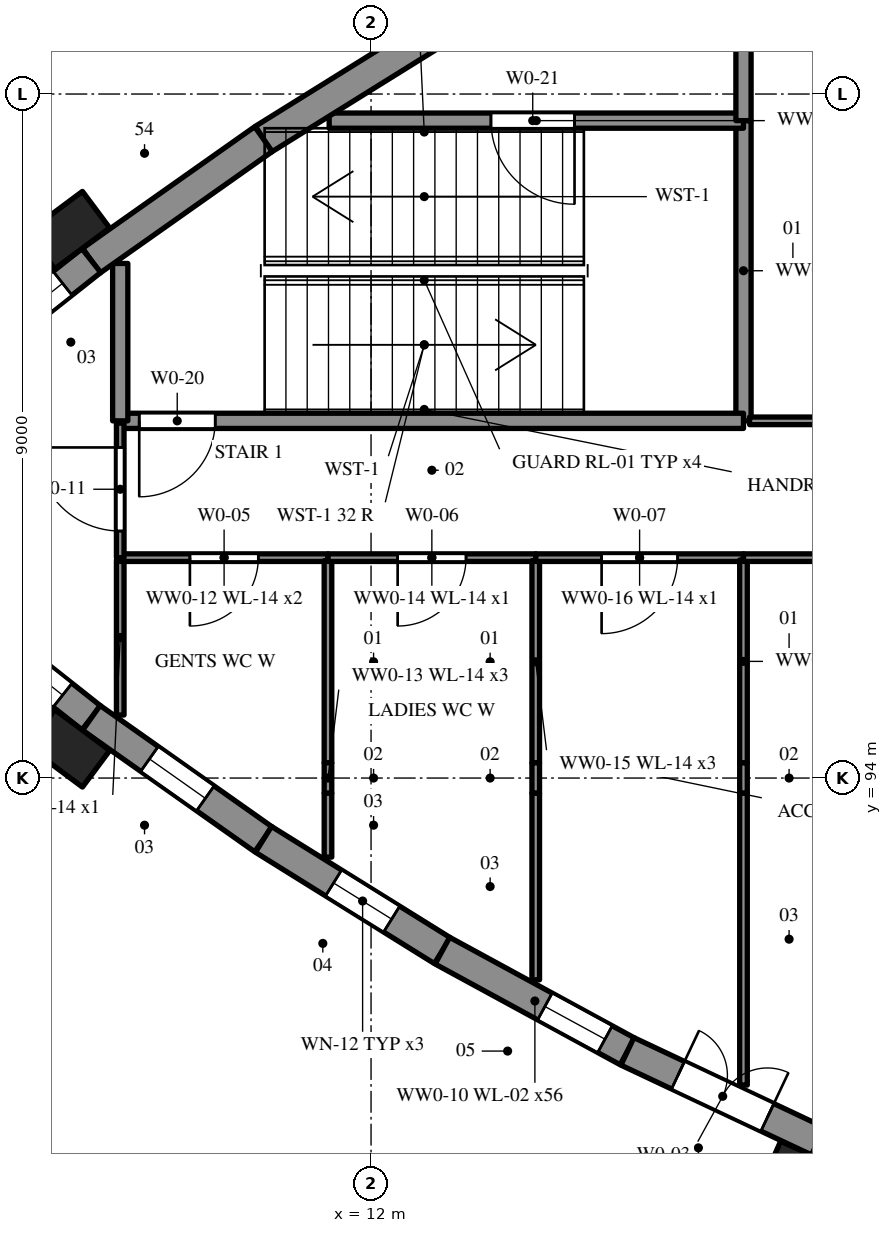
"""IFC4 building model, lengths in metres.
Left out: names, types, materials, properties, quantities, classifications, styles, units other than length and angle.
Written with IfcOpenShell. Run it as: python <this file> out.ifc"""

import sys

from ifc_helpers import new_model, si_unit, direction, frame, frame_2d, origin, origin_2d, place, context, subcontext, project, spatial, rectangle, extrude, element, fill, save


model = new_model("IFC4")
c1 = context("Model", 3, precision=1e-05, world=origin(), true_north=direction((0.0, 1.0)))
c2 = subcontext(c1, "Body", "Model", "MODEL_VIEW")
j1 = project(units=[si_unit("LENGTHUNIT", "METRE"), si_unit("PLANEANGLEUNIT", "RADIAN")], contexts=[c1])
p1 = place(None, origin())
s1 = spatial("IfcSite", under=j1, at=p1, CompositionType="ELEMENT")
p2 = place(p1, origin())
s2 = spatial("IfcBuilding", under=s1, at=p2, CompositionType="ELEMENT")
p3 = place(p2, origin())
s3 = spatial("IfcBuildingStorey", under=s2, at=p3, CompositionType="ELEMENT", Elevation=0.0)
p4 = place(p3, frame((16.9, 102.65, -0.25), z_axis=(0.0, 0.0, 1.0), x_axis=(0.0, -1.0, 0.0)))
e1 = element("IfcWall", 1, at=p4, inside=s3, PredefinedType="SHEAR", context=c2, shape_type="SweptSolid", body=[
    extrude(rectangle(XDim=3.95, YDim=0.2, at=frame_2d((1.975, 0.0))), origin(), (0.0, 0.0, 1.0), 5.65),
])
p5 = place(p3, frame((16.9, 98.7, -0.25), z_axis=(0.0, 0.0, 1.0), x_axis=(-1.0, 0.0, 0.0)))
e2 = element("IfcWall", 2, at=p5, inside=s3, PredefinedType="SHEAR", context=c2, shape_type="SweptSolid", body=[
    extrude(rectangle(XDim=8.2, YDim=0.2, at=frame_2d((4.1, 0.0))), origin(), (0.0, 0.0, 1.0), 5.65),
])
p6 = place(p5, frame((6.95, 0.0, 0.25)))
e3 = element("IfcOpeningElement", 3, at=p6, cuts=e2, PredefinedType="OPENING", context=c2, shape_type="SweptSolid", body=[
    extrude(rectangle(XDim=1.0, YDim=2.4, at=frame_2d((0.5, 1.2))), frame((0.0, 0.11, 0.0), z_axis=(0.0, -1.0, 0.0), x_axis=(1.0, 0.0, 0.0)), (0.0, 0.0, 1.0), 0.22),
])
p7 = place(p3, frame((8.7, 98.7, -0.25), z_axis=(0.0, 0.0, 1.0), x_axis=(0.0, 1.0, 0.0)))
e4 = element("IfcWall", 4, at=p7, inside=s3, PredefinedType="SHEAR", context=c2, shape_type="SweptSolid", body=[
    extrude(rectangle(XDim=2.071, YDim=0.2, at=frame_2d((1.035, 0.0))), origin(), (0.0, 0.0, 1.0), 5.65),
])
p8 = place(p3, frame((11.449, 102.65, -0.25), z_axis=(0.0, 0.0, 1.0), x_axis=(1.0, 0.0, 0.0)))
e5 = element("IfcWall", 5, at=p8, inside=s3, PredefinedType="SHEAR", context=c2, shape_type="SweptSolid", body=[
    extrude(rectangle(XDim=5.451, YDim=0.2, at=frame_2d((2.726, 0.0))), origin(), (0.0, 0.0, 1.0), 5.65),
])
p9 = place(p8, frame((2.128, 0.0, 0.25)))
e6 = element("IfcOpeningElement", 6, at=p9, cuts=e5, PredefinedType="OPENING", context=c2, shape_type="SweptSolid", body=[
    extrude(rectangle(XDim=1.1, YDim=2.1, at=frame_2d((0.55, 1.05))), frame((0.0, 0.11, 0.0), z_axis=(0.0, -1.0, 0.0), x_axis=(1.0, 0.0, 0.0)), (0.0, 0.0, 1.0), 0.22),
])
p10 = place(p3, frame((16.9, 105.64, -0.25), z_axis=(0.0, 0.0, 1.0), x_axis=(0.0, -1.0, 0.0)))
e7 = element("IfcWall", 7, at=p10, inside=s3, PredefinedType="SHEAR", context=c2, shape_type="SweptSolid", body=[
    extrude(rectangle(XDim=2.99, YDim=0.2, at=frame_2d((1.495, 0.0))), origin(), (0.0, 0.0, 1.0), 5.65),
])
p11 = place(p3, frame((6.387, 96.32, -0.25), z_axis=(0.0, 0.0, 1.0), x_axis=(0.784278812541, -0.620408530082, 0.0)))
e8 = element("IfcWall", 8, at=p11, inside=s3, PredefinedType="SOLIDWALL", context=c2, shape_type="SweptSolid", body=[
    extrude(rectangle(XDim=2.464, YDim=0.4, at=frame_2d((1.232, 0.0))), origin(), (0.0, 0.0, 1.0), 5.65),
])
p12 = place(p11, frame((0.482, 0.0, 2.65)))
e9 = element("IfcOpeningElement", 9, at=p12, cuts=e8, PredefinedType="OPENING", context=c2, shape_type="SweptSolid", body=[
    extrude(rectangle(XDim=1.5, YDim=0.6, at=frame_2d((0.75, 0.3))), frame((0.0, 0.21, 0.0), z_axis=(0.0, -1.0, 0.0), x_axis=(1.0, 0.0, 0.0)), (0.0, 0.0, 1.0), 0.42),
])
p13 = place(p3, frame((8.32, 94.792, -0.25), z_axis=(0.0, 0.0, 1.0), x_axis=(0.817028877428, -0.576596751161, 0.0)))
e10 = element("IfcWall", 10, at=p13, inside=s3, PredefinedType="SOLIDWALL", context=c2, shape_type="SweptSolid", body=[
    extrude(rectangle(XDim=2.772, YDim=0.4, at=frame_2d((1.386, 0.0))), origin(), (0.0, 0.0, 1.0), 5.65),
])
p14 = place(p13, frame((0.936, 0.0, 1.85)))
e11 = element("IfcOpeningElement", 11, at=p14, cuts=e10, PredefinedType="OPENING", context=c2, shape_type="SweptSolid", body=[
    extrude(rectangle(XDim=0.9, YDim=0.6, at=frame_2d((0.45, 0.3))), frame((0.0, 0.21, 0.0), z_axis=(0.0, -1.0, 0.0), x_axis=(1.0, 0.0, 0.0)), (0.0, 0.0, 1.0), 0.42),
])
p15 = place(p3, frame((10.585, 93.193, -0.25), z_axis=(0.0, 0.0, 1.0), x_axis=(0.84912946359, -0.528184772653, 0.0)))
e12 = element("IfcWall", 12, at=p15, inside=s3, PredefinedType="SOLIDWALL", context=c2, shape_type="SweptSolid", body=[
    extrude(rectangle(XDim=2.772, YDim=0.4, at=frame_2d((1.386, 0.0))), origin(), (0.0, 0.0, 1.0), 5.65),
])
p16 = place(p15, frame((1.086, 0.0, 1.85)))
e13 = element("IfcOpeningElement", 13, at=p16, cuts=e12, PredefinedType="OPENING", context=c2, shape_type="SweptSolid", body=[
    extrude(rectangle(XDim=0.9, YDim=0.6, at=frame_2d((0.45, 0.3))), frame((0.0, 0.21, 0.0), z_axis=(0.0, -1.0, 0.0), x_axis=(1.0, 0.0, 0.0)), (0.0, 0.0, 1.0), 0.42),
])
p17 = place(p3, frame((12.938, 91.729, -0.25), z_axis=(0.0, 0.0, 1.0), x_axis=(0.878292493566, -0.478123724308, 0.0)))
e14 = element("IfcWall", 14, at=p17, inside=s3, PredefinedType="SOLIDWALL", context=c2, shape_type="SweptSolid", body=[
    extrude(rectangle(XDim=2.772, YDim=0.4, at=frame_2d((1.386, 0.0))), origin(), (0.0, 0.0, 1.0), 5.65),
])
p18 = place(p17, frame((1.536, 0.0, 1.85)))
e15 = element("IfcOpeningElement", 15, at=p18, cuts=e14, PredefinedType="OPENING", context=c2, shape_type="SweptSolid", body=[
    extrude(rectangle(XDim=0.9, YDim=0.6, at=frame_2d((0.45, 0.3))), frame((0.0, 0.21, 0.0), z_axis=(0.0, -1.0, 0.0), x_axis=(1.0, 0.0, 0.0)), (0.0, 0.0, 1.0), 0.42),
])
p19 = place(p3, frame((15.373, 90.404, -0.25), z_axis=(0.0, 0.0, 1.0), x_axis=(0.904527098751, -0.42641614372, 0.0)))
e16 = element("IfcWall", 16, at=p19, inside=s3, PredefinedType="SOLIDWALL", context=c2, shape_type="SweptSolid", body=[
    extrude(rectangle(XDim=2.772, YDim=0.4, at=frame_2d((1.386, 0.0))), origin(), (0.0, 0.0, 1.0), 5.65),
])
p20 = place(p19, frame((0.736, 0.0, 0.25)))
e17 = element("IfcOpeningElement", 17, at=p20, cuts=e16, PredefinedType="OPENING", context=c2, shape_type="SweptSolid", body=[
    extrude(rectangle(XDim=1.3, YDim=2.1, at=frame_2d((0.65, 1.05))), frame((0.0, 0.21, 0.0), z_axis=(0.0, -1.0, 0.0), x_axis=(1.0, 0.0, 0.0)), (0.0, 0.0, 1.0), 0.42),
])
for number, where, z_axis, x_axis in (
    (18, (12.938, 103.871, -0.25), (0.0, 0.0, 1.0), (-0.849, -0.528, 0.0)),
    (19, (10.585, 102.407, -0.25), (0.0, 0.0, 1.0), (-0.817, -0.577, 0.0)),
):
    element("IfcWall", number, at=place(p3, frame(where, z_axis=z_axis, x_axis=x_axis)), inside=s3, PredefinedType="SOLIDWALL", context=c2, shape_type="SweptSolid", body=[
        extrude(rectangle(XDim=2.772, YDim=0.4, at=frame_2d((1.386, 0.0))), origin(), (0.0, 0.0, 1.0), 5.65),
    ])
p21 = place(p3, frame((8.32, 100.809, -0.25), z_axis=(0.0, 0.0, 1.0), x_axis=(-0.784278812541, -0.620408530082, 0.0)))
e20 = element("IfcWall", 20, at=p21, inside=s3, PredefinedType="SOLIDWALL", context=c2, shape_type="SweptSolid", body=[
    extrude(rectangle(XDim=2.464, YDim=0.4, at=frame_2d((1.232, 0.0))), origin(), (0.0, 0.0, 1.0), 5.65),
])
p22 = place(p21, frame((0.482, 0.0, 2.65)))
e21 = element("IfcOpeningElement", 21, at=p22, cuts=e20, PredefinedType="OPENING", context=c2, shape_type="SweptSolid", body=[
    extrude(rectangle(XDim=1.5, YDim=0.6, at=frame_2d((0.75, 0.3))), frame((0.0, 0.21, 0.0), z_axis=(0.0, -1.0, 0.0), x_axis=(1.0, 0.0, 0.0)), (0.0, 0.0, 1.0), 0.42),
])
for number, where, z_axis, x_axis in (
    (22, (8.021, 94.391, -0.25), (0.0, 0.0, 1.0), (0.802, -0.597, 0.0)),
    (23, (17.679, 88.764, -0.25), (0.0, 0.0, 1.0), (0.915, -0.403, 0.0)),
    (24, (8.021, 101.209, -0.25), (0.0, 0.0, 1.0), (-0.802, -0.597, 0.0)),
):
    element("IfcColumn", number, at=place(p3, frame(where, z_axis=z_axis, x_axis=x_axis)), inside=s3, PredefinedType="PILASTER", context=c2, shape_type="SweptSolid", body=[
        extrude(rectangle(XDim=0.9, YDim=0.6, at=origin_2d()), origin(), (0.0, 0.0, 1.0), 5.65),
    ])
p23 = place(p3, frame((8.7, 94.829, 0.0), z_axis=(0.0, 0.0, 1.0), x_axis=(0.0, 1.0, 0.0)))
e25 = element("IfcWall", 25, at=p23, inside=s3, PredefinedType="PARTITIONING", context=c2, shape_type="SweptSolid", body=[
    extrude(rectangle(XDim=2.041, YDim=0.1, at=frame_2d((1.021, 0.0))), origin(), (0.0, 0.0, 1.0), 5.12),
])
p24 = place(p3, frame((11.433, 96.9, 0.0), z_axis=(0.0, 0.0, 1.0), x_axis=(-1.0, 0.0, 0.0)))
e26 = element("IfcWall", 26, at=p24, inside=s3, PredefinedType="PARTITIONING", context=c2, shape_type="SweptSolid", body=[
    extrude(rectangle(XDim=2.733, YDim=0.1, at=frame_2d((1.367, 0.0))), origin(), (0.0, 0.0, 1.0), 5.12),
])
p25 = place(p24, frame((0.917, 0.0, 0.0)))
e27 = element("IfcOpeningElement", 27, at=p25, cuts=e26, PredefinedType="OPENING", context=c2, shape_type="SweptSolid", body=[
    extrude(rectangle(XDim=0.9, YDim=2.1, at=frame_2d((0.45, 1.05))), frame((0.0, 0.06, 0.0), z_axis=(0.0, -1.0, 0.0), x_axis=(1.0, 0.0, 0.0)), (0.0, 0.0, 1.0), 0.12),
])
p26 = place(p3, frame((8.7, 96.9, 0.0), z_axis=(0.0, 0.0, 1.0), x_axis=(0.0, 1.0, 0.0)))
e28 = element("IfcWall", 28, at=p26, inside=s3, PredefinedType="PARTITIONING", context=c2, shape_type="SweptSolid", body=[
    extrude(rectangle(XDim=1.77, YDim=0.1, at=frame_2d((0.885, 0.0))), origin(), (0.0, 0.0, 1.0), 5.12),
])
p27 = place(p26, frame((0.35, 0.0, 0.0)))
e29 = element("IfcOpeningElement", 29, at=p27, cuts=e28, PredefinedType="OPENING", context=c2, shape_type="SweptSolid", body=[
    extrude(rectangle(XDim=1.1, YDim=2.1, at=frame_2d((0.55, 1.05))), frame((0.0, 0.06, 0.0), z_axis=(0.0, -1.0, 0.0), x_axis=(1.0, 0.0, 0.0)), (0.0, 0.0, 1.0), 0.12),
])
p28 = place(p3, frame((11.433, 96.86, 0.0), z_axis=(0.0, 0.0, 1.0), x_axis=(0.0, -1.0, 0.0)))
e30 = element("IfcWall", 30, at=p28, inside=s3, PredefinedType="PARTITIONING", context=c2, shape_type="SweptSolid", body=[
    extrude(rectangle(XDim=2.66, YDim=0.1, at=frame_2d((1.33, 0.0))), origin(), (0.0, 0.0, 1.0), 5.12),
])
p29 = place(p3, frame((11.433, 94.2, 0.0), z_axis=(0.0, 0.0, 1.0), x_axis=(0.0, -1.0, 0.0)))
e31 = element("IfcWall", 31, at=p29, inside=s3, PredefinedType="PARTITIONING", context=c2, shape_type="SweptSolid", body=[
    extrude(rectangle(XDim=0.4, YDim=0.1, at=frame_2d((0.2, 0.0))), origin(), (0.0, 0.0, 1.0), 4.32),
])
p30 = place(p3, frame((11.433, 93.8, 0.0), z_axis=(0.0, 0.0, 1.0), x_axis=(0.0, -1.0, 0.0)))
e32 = element("IfcWall", 32, at=p30, inside=s3, PredefinedType="PARTITIONING", context=c2, shape_type="SweptSolid", body=[
    extrude(rectangle(XDim=0.84, YDim=0.1, at=frame_2d((0.42, 0.0))), origin(), (0.0, 0.0, 1.0), 5.12),
])
p31 = place(p3, frame((14.167, 96.9, 0.0), z_axis=(0.0, 0.0, 1.0), x_axis=(-1.0, 0.0, 0.0)))
e33 = element("IfcWall", 33, at=p31, inside=s3, PredefinedType="PARTITIONING", context=c2, shape_type="SweptSolid", body=[
    extrude(rectangle(XDim=2.733, YDim=0.1, at=frame_2d((1.367, 0.0))), origin(), (0.0, 0.0, 1.0), 5.12),
])
p32 = place(p31, frame((0.917, 0.0, 0.0)))
e34 = element("IfcOpeningElement", 34, at=p32, cuts=e33, PredefinedType="OPENING", context=c2, shape_type="SweptSolid", body=[
    extrude(rectangle(XDim=0.9, YDim=2.1, at=frame_2d((0.45, 1.05))), frame((0.0, 0.06, 0.0), z_axis=(0.0, -1.0, 0.0), x_axis=(1.0, 0.0, 0.0)), (0.0, 0.0, 1.0), 0.12),
])
p33 = place(p3, frame((14.167, 96.86, 0.0), z_axis=(0.0, 0.0, 1.0), x_axis=(0.0, -1.0, 0.0)))
e35 = element("IfcWall", 35, at=p33, inside=s3, PredefinedType="PARTITIONING", context=c2, shape_type="SweptSolid", body=[
    extrude(rectangle(XDim=2.66, YDim=0.1, at=frame_2d((1.33, 0.0))), origin(), (0.0, 0.0, 1.0), 5.12),
])
p34 = place(p3, frame((14.167, 94.2, 0.0), z_axis=(0.0, 0.0, 1.0), x_axis=(0.0, -1.0, 0.0)))
e36 = element("IfcWall", 36, at=p34, inside=s3, PredefinedType="PARTITIONING", context=c2, shape_type="SweptSolid", body=[
    extrude(rectangle(XDim=0.4, YDim=0.1, at=frame_2d((0.2, 0.0))), origin(), (0.0, 0.0, 1.0), 4.32),
])
p35 = place(p3, frame((14.167, 93.8, 0.0), z_axis=(0.0, 0.0, 1.0), x_axis=(0.0, -1.0, 0.0)))
e37 = element("IfcWall", 37, at=p35, inside=s3, PredefinedType="PARTITIONING", context=c2, shape_type="SweptSolid", body=[
    extrude(rectangle(XDim=2.455, YDim=0.1, at=frame_2d((1.228, 0.0))), origin(), (0.0, 0.0, 1.0), 5.12),
])
p36 = place(p3, frame((16.9, 96.9, 0.0), z_axis=(0.0, 0.0, 1.0), x_axis=(-1.0, 0.0, 0.0)))
e38 = element("IfcWall", 38, at=p36, inside=s3, PredefinedType="PARTITIONING", context=c2, shape_type="SweptSolid", body=[
    extrude(rectangle(XDim=2.733, YDim=0.1, at=frame_2d((1.367, 0.0))), origin(), (0.0, 0.0, 1.0), 5.12),
])
p37 = place(p36, frame((0.867, 0.0, 0.0)))
e39 = element("IfcOpeningElement", 39, at=p37, cuts=e38, PredefinedType="OPENING", context=c2, shape_type="SweptSolid", body=[
    extrude(rectangle(XDim=1.0, YDim=2.1, at=frame_2d((0.5, 1.05))), frame((0.0, 0.06, 0.0), z_axis=(0.0, -1.0, 0.0), x_axis=(1.0, 0.0, 0.0)), (0.0, 0.0, 1.0), 0.12),
])
p38 = place(p3, frame((16.9, 96.87, 0.0), z_axis=(0.0, 0.0, 1.0), x_axis=(0.0, -1.0, 0.0)))
e40 = element("IfcWall", 40, at=p38, inside=s3, PredefinedType="PARTITIONING", context=c2, shape_type="SweptSolid", body=[
    extrude(rectangle(XDim=2.67, YDim=0.1, at=frame_2d((1.335, 0.0))), origin(), (0.0, 0.0, 1.0), 5.12),
])
p39 = place(p3, frame((16.9, 94.2, 0.0), z_axis=(0.0, 0.0, 1.0), x_axis=(0.0, -1.0, 0.0)))
e41 = element("IfcWall", 41, at=p39, inside=s3, PredefinedType="PARTITIONING", context=c2, shape_type="SweptSolid", body=[
    extrude(rectangle(XDim=0.4, YDim=0.1, at=frame_2d((0.2, 0.0))), origin(), (0.0, 0.0, 1.0), 4.32),
])
p40 = place(p3, frame((16.9, 93.8, 0.0), z_axis=(0.0, 0.0, 1.0), x_axis=(0.0, -1.0, 0.0)))
e42 = element("IfcWall", 42, at=p40, inside=s3, PredefinedType="PARTITIONING", context=c2, shape_type="SweptSolid", body=[
    extrude(rectangle(XDim=3.84, YDim=0.1, at=frame_2d((1.92, 0.0))), origin(), (0.0, 0.0, 1.0), 5.12),
])
p41 = place(p3, frame((20.825, 96.9, 0.0), z_axis=(0.0, 0.0, 1.0), x_axis=(-1.0, 0.0, 0.0)))
e43 = element("IfcWall", 43, at=p41, inside=s3, PredefinedType="PARTITIONING", context=c2, shape_type="SweptSolid", body=[
    extrude(rectangle(XDim=3.925, YDim=0.1, at=frame_2d((1.962, 0.0))), origin(), (0.0, 0.0, 1.0), 5.12),
])
p42 = place(p3, frame((16.98, 98.7, 0.0), z_axis=(0.0, 0.0, 1.0), x_axis=(1.0, 0.0, 0.0)))
e44 = element("IfcWall", 44, at=p42, inside=s3, PredefinedType="PARTITIONING", context=c2, shape_type="SweptSolid", body=[
    extrude(rectangle(XDim=3.845, YDim=0.1, at=frame_2d((1.922, 0.0))), origin(), (0.0, 0.0, 1.0), 5.12),
])
p43 = place(p20, origin())
e45 = element("IfcDoor", 45, at=p43, inside=s3, OperationType="DOUBLE_DOOR_SINGLE_SWING", PredefinedType="DOOR", context=c2, shape_type="SweptSolid", body=[
    extrude(rectangle(XDim=1.3, YDim=2.1, at=frame_2d((0.65, 1.05))), frame((0.0, 0.025, 0.0), z_axis=(0.0, -1.0, 0.0), x_axis=(1.0, 0.0, 0.0)), (0.0, 0.0, 1.0), 0.05),
])
fill(e17, e45)
p44 = place(p12, origin())
e46 = element("IfcWindow", 46, at=p44, inside=s3, PartitioningType="SINGLE_PANEL", PredefinedType="WINDOW", context=c2, shape_type="SweptSolid", body=[
    extrude(rectangle(XDim=1.5, YDim=0.6, at=frame_2d((0.75, 0.3))), frame((0.0, 0.03, 0.0), z_axis=(0.0, -1.0, 0.0), x_axis=(1.0, 0.0, 0.0)), (0.0, 0.0, 1.0), 0.06),
])
fill(e9, e46)
p45 = place(p14, origin())
e47 = element("IfcWindow", 47, at=p45, inside=s3, PartitioningType="SINGLE_PANEL", PredefinedType="WINDOW", context=c2, shape_type="SweptSolid", body=[
    extrude(rectangle(XDim=0.9, YDim=0.6, at=frame_2d((0.45, 0.3))), frame((0.0, 0.03, 0.0), z_axis=(0.0, -1.0, 0.0), x_axis=(1.0, 0.0, 0.0)), (0.0, 0.0, 1.0), 0.06),
])
fill(e11, e47)
p46 = place(p16, origin())
e48 = element("IfcWindow", 48, at=p46, inside=s3, PartitioningType="SINGLE_PANEL", PredefinedType="WINDOW", context=c2, shape_type="SweptSolid", body=[
    extrude(rectangle(XDim=0.9, YDim=0.6, at=frame_2d((0.45, 0.3))), frame((0.0, 0.03, 0.0), z_axis=(0.0, -1.0, 0.0), x_axis=(1.0, 0.0, 0.0)), (0.0, 0.0, 1.0), 0.06),
])
fill(e13, e48)
p47 = place(p18, origin())
e49 = element("IfcWindow", 49, at=p47, inside=s3, PartitioningType="SINGLE_PANEL", PredefinedType="WINDOW", context=c2, shape_type="SweptSolid", body=[
    extrude(rectangle(XDim=0.9, YDim=0.6, at=frame_2d((0.45, 0.3))), frame((0.0, 0.03, 0.0), z_axis=(0.0, -1.0, 0.0), x_axis=(1.0, 0.0, 0.0)), (0.0, 0.0, 1.0), 0.06),
])
fill(e15, e49)
p48 = place(p22, origin())
e50 = element("IfcWindow", 50, at=p48, inside=s3, PartitioningType="SINGLE_PANEL", PredefinedType="WINDOW", context=c2, shape_type="SweptSolid", body=[
    extrude(rectangle(XDim=1.5, YDim=0.6, at=frame_2d((0.75, 0.3))), frame((0.0, 0.03, 0.0), z_axis=(0.0, -1.0, 0.0), x_axis=(1.0, 0.0, 0.0)), (0.0, 0.0, 1.0), 0.06),
])
fill(e21, e50)
p49 = place(p25, origin())
e51 = element("IfcDoor", 51, at=p49, inside=s3, OperationType="SINGLE_SWING_RIGHT", PredefinedType="DOOR", context=c2, shape_type="SweptSolid", body=[
    extrude(rectangle(XDim=0.9, YDim=2.1, at=frame_2d((0.45, 1.05))), frame((0.0, 0.025, 0.0), z_axis=(0.0, -1.0, 0.0), x_axis=(1.0, 0.0, 0.0)), (0.0, 0.0, 1.0), 0.05),
])
fill(e27, e51)
p50 = place(p32, origin())
e52 = element("IfcDoor", 52, at=p50, inside=s3, OperationType="SINGLE_SWING_RIGHT", PredefinedType="DOOR", context=c2, shape_type="SweptSolid", body=[
    extrude(rectangle(XDim=0.9, YDim=2.1, at=frame_2d((0.45, 1.05))), frame((0.0, 0.025, 0.0), z_axis=(0.0, -1.0, 0.0), x_axis=(1.0, 0.0, 0.0)), (0.0, 0.0, 1.0), 0.05),
])
fill(e34, e52)
p51 = place(p37, origin())
e53 = element("IfcDoor", 53, at=p51, inside=s3, OperationType="SINGLE_SWING_RIGHT", PredefinedType="DOOR", context=c2, shape_type="SweptSolid", body=[
    extrude(rectangle(XDim=1.0, YDim=2.1, at=frame_2d((0.5, 1.05))), frame((0.0, 0.025, 0.0), z_axis=(0.0, -1.0, 0.0), x_axis=(1.0, 0.0, 0.0)), (0.0, 0.0, 1.0), 0.05),
])
fill(e39, e53)
p52 = place(p27, origin())
e54 = element("IfcDoor", 54, at=p52, inside=s3, OperationType="SINGLE_SWING_RIGHT", PredefinedType="DOOR", context=c2, shape_type="SweptSolid", body=[
    extrude(rectangle(XDim=1.1, YDim=2.1, at=frame_2d((0.55, 1.05))), frame((0.0, 0.025, 0.0), z_axis=(0.0, -1.0, 0.0), x_axis=(1.0, 0.0, 0.0)), (0.0, 0.0, 1.0), 0.05),
])
fill(e29, e54)
p53 = place(p6, origin())
e55 = element("IfcDoor", 55, at=p53, inside=s3, OperationType="SINGLE_SWING_RIGHT", PredefinedType="DOOR", context=c2, shape_type="SweptSolid", body=[
    extrude(rectangle(XDim=1.0, YDim=2.4, at=frame_2d((0.5, 1.2))), frame((0.0, 0.025, 0.0), z_axis=(0.0, -1.0, 0.0), x_axis=(1.0, 0.0, 0.0)), (0.0, 0.0, 1.0), 0.05),
])
fill(e3, e55)
p54 = place(p9, frame((1.1, 0.0, 0.0), z_axis=(0.0, 0.0, 1.0), x_axis=(-1.0, 0.0, 0.0)))
e56 = element("IfcDoor", 56, at=p54, inside=s3, OperationType="SINGLE_SWING_LEFT", PredefinedType="DOOR", context=c2, shape_type="SweptSolid", body=[
    extrude(rectangle(XDim=1.1, YDim=2.1, at=frame_2d((0.55, 1.05))), frame((0.0, 0.025, 0.0), z_axis=(0.0, -1.0, 0.0), x_axis=(1.0, 0.0, 0.0)), (0.0, 0.0, 1.0), 0.05),
])
fill(e6, e56)
save(model, sys.argv[1])
